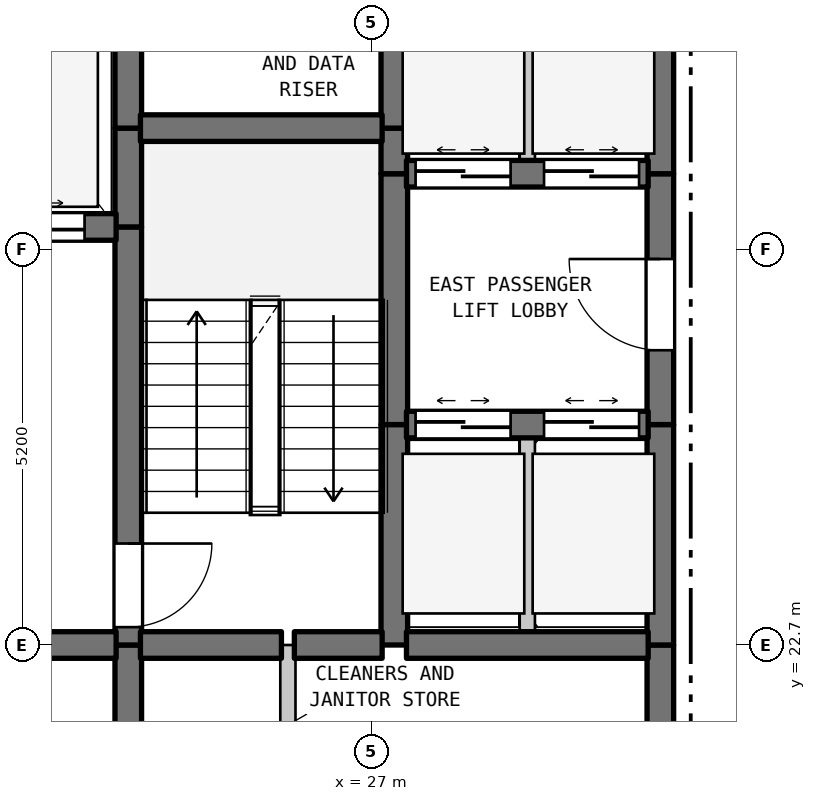
"""IFC4 building model, lengths in metres.
Left out: names, types, materials, properties, quantities, classifications, styles, units other than length and angle.
Written with IfcOpenShell. Run it as: python <this file> out.ifc"""

import sys

from ifc_helpers import new_model, si_unit, direction, frame, frame_2d, origin, place, context, subcontext, project, spatial, rectangle, extrude, element, fill, save


model = new_model("IFC4")
c1 = context("Model", 3, precision=1e-05, world=origin(), true_north=direction((0.0, 1.0)))
c2 = subcontext(c1, "Body", "Model", "MODEL_VIEW")
j1 = project(units=[si_unit("LENGTHUNIT", "METRE"), si_unit("PLANEANGLEUNIT", "RADIAN")], contexts=[c1])
p1 = place(None, origin())
s1 = spatial("IfcSite", under=j1, at=p1, CompositionType="ELEMENT")
p2 = place(p1, origin())
s2 = spatial("IfcBuilding", under=s1, at=p2, CompositionType="ELEMENT")
p3 = place(p2, frame((0.0, 0.0, 199.5)))
s3 = spatial("IfcBuildingStorey", under=s2, at=p3, CompositionType="ELEMENT", Elevation=199.5)
p4 = place(p3, frame((23.8, 19.5, 0.0), z_axis=(0.0, 0.0, 1.0), x_axis=(0.0, 1.0, 0.0)))
e1 = element("IfcWall", 1, at=p4, inside=s3, PredefinedType="SHEAR", context=c2, shape_type="SweptSolid", body=[
    extrude(rectangle(XDim=3.2, YDim=0.35, at=frame_2d((1.6, 0.0))), origin(), (0.0, 0.0, 1.0), 3.39),
])
p5 = place(p3, frame((23.8, 22.7, 0.0), z_axis=(0.0, 0.0, 1.0), x_axis=(0.0, 1.0, 0.0)))
e2 = element("IfcWall", 2, at=p5, inside=s3, PredefinedType="SHEAR", context=c2, shape_type="SweptSolid", body=[
    extrude(rectangle(XDim=5.5, YDim=0.35, at=frame_2d((2.75, 0.0))), origin(), (0.0, 0.0, 1.0), 3.39),
])
p6 = place(p5, frame((0.235, 0.0, 0.0)))
e3 = element("IfcOpeningElement", 3, at=p6, cuts=e2, PredefinedType="OPENING", context=c2, shape_type="SweptSolid", body=[
    extrude(rectangle(XDim=1.1, YDim=2.15, at=frame_2d((0.55, 1.075))), frame((0.0, 0.185, 0.0), z_axis=(0.0, -1.0, 0.0), x_axis=(1.0, 0.0, 0.0)), (0.0, 0.0, 1.0), 0.37),
])
for number, where, z_axis, x_axis in (
    (4, (23.8, 28.2, 0.0), (0.0, 0.0, 1.0), (0.0, 1.0, 0.0)),
    (5, (23.8, 29.5, 0.0), (0.0, 0.0, 1.0), (0.0, 1.0, 0.0)),
):
    element("IfcWall", number, at=place(p3, frame(where, z_axis=z_axis, x_axis=x_axis)), inside=s3, PredefinedType="SHEAR", context=c2, shape_type="SweptSolid", body=[
        extrude(rectangle(XDim=1.3, YDim=0.35, at=frame_2d((0.65, 0.0))), origin(), (0.0, 0.0, 1.0), 3.39),
    ])
p7 = place(p3, frame((25.9, 19.5, 0.0), z_axis=(0.0, 0.0, 1.0), x_axis=(0.0, 1.0, 0.0)))
e6 = element("IfcWall", 6, at=p7, inside=s3, PredefinedType="STANDARD", context=c2, shape_type="SweptSolid", body=[
    extrude(rectangle(XDim=3.2, YDim=0.2, at=frame_2d((1.6, 0.0))), origin(), (0.0, 0.0, 1.0), 3.39),
])
p8 = place(p3, frame((27.3, 22.7, 0.0), z_axis=(0.0, 0.0, 1.0), x_axis=(0.0, 1.0, 0.0)))
e7 = element("IfcWall", 7, at=p8, inside=s3, PredefinedType="SHEAR", context=c2, shape_type="SweptSolid", body=[
    extrude(rectangle(XDim=2.9, YDim=0.35, at=frame_2d((1.45, 0.0))), origin(), (0.0, 0.0, 1.0), 3.39),
])
p9 = place(p3, frame((27.3, 25.6, 0.0), z_axis=(0.0, 0.0, 1.0), x_axis=(0.0, 1.0, 0.0)))
e8 = element("IfcWall", 8, at=p9, inside=s3, PredefinedType="SHEAR", context=c2, shape_type="SweptSolid", body=[
    extrude(rectangle(XDim=3.3, YDim=0.35, at=frame_2d((1.65, 0.0))), origin(), (0.0, 0.0, 1.0), 3.39),
])
p10 = place(p3, frame((27.3, 28.9, 0.0), z_axis=(0.0, 0.0, 1.0), x_axis=(0.0, 1.0, 0.0)))
e9 = element("IfcWall", 9, at=p10, inside=s3, PredefinedType="SHEAR", context=c2, shape_type="SweptSolid", body=[
    extrude(rectangle(XDim=0.6, YDim=0.35, at=frame_2d((0.3, 0.0))), origin(), (0.0, 0.0, 1.0), 3.39),
])
p11 = place(p3, frame((27.3, 29.5, 0.0), z_axis=(0.0, 0.0, 1.0), x_axis=(0.0, 1.0, 0.0)))
e10 = element("IfcWall", 10, at=p11, inside=s3, PredefinedType="SHEAR", context=c2, shape_type="SweptSolid", body=[
    extrude(rectangle(XDim=2.0, YDim=0.35, at=frame_2d((1.0, 0.0))), origin(), (0.0, 0.0, 1.0), 3.39),
])
p12 = place(p3, frame((29.05, 22.7, 0.0), z_axis=(0.0, 0.0, 1.0), x_axis=(0.0, 1.0, 0.0)))
e11 = element("IfcWall", 11, at=p12, inside=s3, PredefinedType="STANDARD", context=c2, shape_type="SweptSolid", body=[
    extrude(rectangle(XDim=2.9, YDim=0.2, at=frame_2d((1.45, 0.0))), origin(), (0.0, 0.0, 1.0), 3.39),
])
p13 = place(p3, frame((29.05, 28.9, 0.0), z_axis=(0.0, 0.0, 1.0), x_axis=(0.0, 1.0, 0.0)))
e12 = element("IfcWall", 12, at=p13, inside=s3, PredefinedType="STANDARD", context=c2, shape_type="SweptSolid", body=[
    extrude(rectangle(XDim=2.6, YDim=0.2, at=frame_2d((1.3, 0.0))), origin(), (0.0, 0.0, 1.0), 3.39),
])
p14 = place(p3, frame((30.8, 19.5, 0.0), z_axis=(0.0, 0.0, 1.0), x_axis=(0.0, 1.0, 0.0)))
e13 = element("IfcWall", 13, at=p14, inside=s3, PredefinedType="SHEAR", context=c2, shape_type="SweptSolid", body=[
    extrude(rectangle(XDim=3.2, YDim=0.35, at=frame_2d((1.6, 0.0))), origin(), (0.0, 0.0, 1.0), 3.39),
])
p15 = place(p3, frame((30.8, 22.7, 0.0), z_axis=(0.0, 0.0, 1.0), x_axis=(0.0, 1.0, 0.0)))
e14 = element("IfcWall", 14, at=p15, inside=s3, PredefinedType="SHEAR", context=c2, shape_type="SweptSolid", body=[
    extrude(rectangle(XDim=2.9, YDim=0.35, at=frame_2d((1.45, 0.0))), origin(), (0.0, 0.0, 1.0), 3.39),
])
p16 = place(p3, frame((30.8, 25.6, 0.0), z_axis=(0.0, 0.0, 1.0), x_axis=(0.0, 1.0, 0.0)))
e15 = element("IfcWall", 15, at=p16, inside=s3, PredefinedType="SHEAR", context=c2, shape_type="SweptSolid", body=[
    extrude(rectangle(XDim=3.3, YDim=0.35, at=frame_2d((1.65, 0.0))), origin(), (0.0, 0.0, 1.0), 3.39),
])
p17 = place(p16, frame((0.978, 0.0, 0.0)))
e16 = element("IfcOpeningElement", 16, at=p17, cuts=e15, PredefinedType="OPENING", context=c2, shape_type="SweptSolid", body=[
    extrude(rectangle(XDim=1.2, YDim=2.2, at=frame_2d((0.6, 1.1))), frame((0.0, 0.185, 0.0), z_axis=(0.0, -1.0, 0.0), x_axis=(1.0, 0.0, 0.0)), (0.0, 0.0, 1.0), 0.37),
])
p18 = place(p3, frame((30.8, 28.9, 0.0), z_axis=(0.0, 0.0, 1.0), x_axis=(0.0, 1.0, 0.0)))
e17 = element("IfcWall", 17, at=p18, inside=s3, PredefinedType="SHEAR", context=c2, shape_type="SweptSolid", body=[
    extrude(rectangle(XDim=2.6, YDim=0.35, at=frame_2d((1.3, 0.0))), origin(), (0.0, 0.0, 1.0), 3.39),
])
p19 = place(p3, frame((19.16, 22.7, 0.0), z_axis=(0.0, 0.0, 1.0), x_axis=(1.0, 0.0, 0.0)))
e18 = element("IfcWall", 18, at=p19, inside=s3, PredefinedType="SHEAR", context=c2, shape_type="SweptSolid", body=[
    extrude(rectangle(XDim=4.48, YDim=0.35, at=frame_2d((2.24, 0.0))), origin(), (0.0, 0.0, 1.0), 3.39),
])
p20 = place(p19, frame((1.64, 0.0, 0.0)))
e19 = element("IfcOpeningElement", 19, at=p20, cuts=e18, PredefinedType="OPENING", context=c2, shape_type="SweptSolid", body=[
    extrude(rectangle(XDim=1.2, YDim=2.2, at=frame_2d((0.6, 1.1))), frame((0.0, 0.185, 0.0), z_axis=(0.0, -1.0, 0.0), x_axis=(1.0, 0.0, 0.0)), (0.0, 0.0, 1.0), 0.37),
])
p21 = place(p3, frame((23.96, 22.7, 0.0), z_axis=(0.0, 0.0, 1.0), x_axis=(1.0, 0.0, 0.0)))
e20 = element("IfcWall", 20, at=p21, inside=s3, PredefinedType="SHEAR", context=c2, shape_type="SweptSolid", body=[
    extrude(rectangle(XDim=1.855, YDim=0.35, at=frame_2d((0.927, 0.0))), origin(), (0.0, 0.0, 1.0), 3.39),
])
p22 = place(p3, frame((25.985, 22.7, 0.0), z_axis=(0.0, 0.0, 1.0), x_axis=(1.0, 0.0, 0.0)))
e21 = element("IfcWall", 21, at=p22, inside=s3, PredefinedType="SHEAR", context=c2, shape_type="SweptSolid", body=[
    extrude(rectangle(XDim=1.155, YDim=0.35, at=frame_2d((0.577, 0.0))), origin(), (0.0, 0.0, 1.0), 3.39),
])
p23 = place(p3, frame((27.46, 22.7, 0.0), z_axis=(0.0, 0.0, 1.0), x_axis=(1.0, 0.0, 0.0)))
e22 = element("IfcWall", 22, at=p23, inside=s3, PredefinedType="SHEAR", context=c2, shape_type="SweptSolid", body=[
    extrude(rectangle(XDim=3.18, YDim=0.35, at=frame_2d((1.59, 0.0))), origin(), (0.0, 0.0, 1.0), 3.39),
])
p24 = place(p3, frame((27.46, 25.6, 0.0), z_axis=(0.0, 0.0, 1.0), x_axis=(1.0, 0.0, 0.0)))
e23 = element("IfcWall", 23, at=p24, inside=s3, PredefinedType="SHEAR", context=c2, shape_type="SweptSolid", body=[
    extrude(rectangle(XDim=3.18, YDim=0.35, at=frame_2d((1.59, 0.0))), origin(), (0.0, 0.0, 1.0), 3.39),
])
p25 = place(p24, frame((0.12, 0.0, 0.0)))
e24 = element("IfcOpeningElement", 24, at=p25, cuts=e23, PredefinedType="OPENING", context=c2, shape_type="SweptSolid", body=[
    extrude(rectangle(XDim=1.25, YDim=2.2, at=frame_2d((0.625, 1.1))), frame((0.0, 0.185, 0.0), z_axis=(0.0, -1.0, 0.0), x_axis=(1.0, 0.0, 0.0)), (0.0, 0.0, 1.0), 0.37),
])
p26 = place(p24, frame((1.81, 0.0, 0.0)))
e25 = element("IfcOpeningElement", 25, at=p26, cuts=e23, PredefinedType="OPENING", context=c2, shape_type="SweptSolid", body=[
    extrude(rectangle(XDim=1.25, YDim=2.2, at=frame_2d((0.625, 1.1))), frame((0.0, 0.185, 0.0), z_axis=(0.0, -1.0, 0.0), x_axis=(1.0, 0.0, 0.0)), (0.0, 0.0, 1.0), 0.37),
])
p27 = place(p3, frame((19.16, 28.2, 0.0), z_axis=(0.0, 0.0, 1.0), x_axis=(1.0, 0.0, 0.0)))
e26 = element("IfcWall", 26, at=p27, inside=s3, PredefinedType="SHEAR", context=c2, shape_type="SweptSolid", body=[
    extrude(rectangle(XDim=4.48, YDim=0.35, at=frame_2d((2.24, 0.0))), origin(), (0.0, 0.0, 1.0), 3.39),
])
p28 = place(p27, frame((0.415, 0.0, 0.0)))
e27 = element("IfcOpeningElement", 27, at=p28, cuts=e26, PredefinedType="OPENING", context=c2, shape_type="SweptSolid", body=[
    extrude(rectangle(XDim=1.25, YDim=2.2, at=frame_2d((0.625, 1.1))), frame((0.0, 0.185, 0.0), z_axis=(0.0, -1.0, 0.0), x_axis=(1.0, 0.0, 0.0)), (0.0, 0.0, 1.0), 0.37),
])
p29 = place(p27, frame((2.815, 0.0, 0.0)))
e28 = element("IfcOpeningElement", 28, at=p29, cuts=e26, PredefinedType="OPENING", context=c2, shape_type="SweptSolid", body=[
    extrude(rectangle(XDim=1.25, YDim=2.2, at=frame_2d((0.625, 1.1))), frame((0.0, 0.185, 0.0), z_axis=(0.0, -1.0, 0.0), x_axis=(1.0, 0.0, 0.0)), (0.0, 0.0, 1.0), 0.37),
])
p30 = place(p3, frame((27.46, 28.9, 0.0), z_axis=(0.0, 0.0, 1.0), x_axis=(1.0, 0.0, 0.0)))
e29 = element("IfcWall", 29, at=p30, inside=s3, PredefinedType="SHEAR", context=c2, shape_type="SweptSolid", body=[
    extrude(rectangle(XDim=3.18, YDim=0.35, at=frame_2d((1.59, 0.0))), origin(), (0.0, 0.0, 1.0), 3.39),
])
p31 = place(p30, frame((0.12, 0.0, 0.0)))
e30 = element("IfcOpeningElement", 30, at=p31, cuts=e29, PredefinedType="OPENING", context=c2, shape_type="SweptSolid", body=[
    extrude(rectangle(XDim=1.25, YDim=2.2, at=frame_2d((0.625, 1.1))), frame((0.0, 0.185, 0.0), z_axis=(0.0, -1.0, 0.0), x_axis=(1.0, 0.0, 0.0)), (0.0, 0.0, 1.0), 0.37),
])
p32 = place(p30, frame((1.81, 0.0, 0.0)))
e31 = element("IfcOpeningElement", 31, at=p32, cuts=e29, PredefinedType="OPENING", context=c2, shape_type="SweptSolid", body=[
    extrude(rectangle(XDim=1.25, YDim=2.2, at=frame_2d((0.625, 1.1))), frame((0.0, 0.185, 0.0), z_axis=(0.0, -1.0, 0.0), x_axis=(1.0, 0.0, 0.0)), (0.0, 0.0, 1.0), 0.37),
])
p33 = place(p3, frame((23.96, 29.5, 0.0), z_axis=(0.0, 0.0, 1.0), x_axis=(1.0, 0.0, 0.0)))
e32 = element("IfcWall", 32, at=p33, inside=s3, PredefinedType="SHEAR", context=c2, shape_type="SweptSolid", body=[
    extrude(rectangle(XDim=3.18, YDim=0.35, at=frame_2d((1.59, 0.0))), origin(), (0.0, 0.0, 1.0), 3.39),
])
p34 = place(p6, frame((1.1, 0.0, 0.0), z_axis=(0.0, 0.0, 1.0), x_axis=(-1.0, 0.0, 0.0)))
e33 = element("IfcDoor", 33, at=p34, inside=s3, OperationType="SINGLE_SWING_RIGHT", PredefinedType="DOOR", context=c2, shape_type="SweptSolid", body=[
    extrude(rectangle(XDim=1.1, YDim=2.15, at=frame_2d((0.55, 1.075))), frame((0.0, 0.025, 0.0), z_axis=(0.0, -1.0, 0.0), x_axis=(1.0, 0.0, 0.0)), (0.0, 0.0, 1.0), 0.05),
])
fill(e3, e33)
p35 = place(p17, origin())
e34 = element("IfcDoor", 34, at=p35, inside=s3, OperationType="SINGLE_SWING_RIGHT", PredefinedType="DOOR", context=c2, shape_type="SweptSolid", body=[
    extrude(rectangle(XDim=1.2, YDim=2.2, at=frame_2d((0.6, 1.1))), frame((0.0, 0.025, 0.0), z_axis=(0.0, -1.0, 0.0), x_axis=(1.0, 0.0, 0.0)), (0.0, 0.0, 1.0), 0.05),
])
fill(e16, e34)
p36 = place(p25, origin())
e35 = element("IfcDoor", 35, at=p36, inside=s3, OperationType="DOUBLE_DOOR_SLIDING", PredefinedType="DOOR", context=c2, shape_type="SweptSolid", body=[
    extrude(rectangle(XDim=1.25, YDim=2.2, at=frame_2d((0.625, 1.1))), frame((0.0, 0.025, 0.0), z_axis=(0.0, -1.0, 0.0), x_axis=(1.0, 0.0, 0.0)), (0.0, 0.0, 1.0), 0.05),
])
fill(e24, e35)
p37 = place(p26, origin())
e36 = element("IfcDoor", 36, at=p37, inside=s3, OperationType="DOUBLE_DOOR_SLIDING", PredefinedType="DOOR", context=c2, shape_type="SweptSolid", body=[
    extrude(rectangle(XDim=1.25, YDim=2.2, at=frame_2d((0.625, 1.1))), frame((0.0, 0.025, 0.0), z_axis=(0.0, -1.0, 0.0), x_axis=(1.0, 0.0, 0.0)), (0.0, 0.0, 1.0), 0.05),
])
fill(e25, e36)
p38 = place(p29, origin())
e37 = element("IfcDoor", 37, at=p38, inside=s3, OperationType="DOUBLE_DOOR_SLIDING", PredefinedType="DOOR", context=c2, shape_type="SweptSolid", body=[
    extrude(rectangle(XDim=1.25, YDim=2.2, at=frame_2d((0.625, 1.1))), frame((0.0, 0.025, 0.0), z_axis=(0.0, -1.0, 0.0), x_axis=(1.0, 0.0, 0.0)), (0.0, 0.0, 1.0), 0.05),
])
fill(e28, e37)
p39 = place(p31, origin())
e38 = element("IfcDoor", 38, at=p39, inside=s3, OperationType="DOUBLE_DOOR_SLIDING", PredefinedType="DOOR", context=c2, shape_type="SweptSolid", body=[
    extrude(rectangle(XDim=1.25, YDim=2.2, at=frame_2d((0.625, 1.1))), frame((0.0, 0.025, 0.0), z_axis=(0.0, -1.0, 0.0), x_axis=(1.0, 0.0, 0.0)), (0.0, 0.0, 1.0), 0.05),
])
fill(e30, e38)
p40 = place(p32, origin())
e39 = element("IfcDoor", 39, at=p40, inside=s3, OperationType="DOUBLE_DOOR_SLIDING", PredefinedType="DOOR", context=c2, shape_type="SweptSolid", body=[
    extrude(rectangle(XDim=1.25, YDim=2.2, at=frame_2d((0.625, 1.1))), frame((0.0, 0.025, 0.0), z_axis=(0.0, -1.0, 0.0), x_axis=(1.0, 0.0, 0.0)), (0.0, 0.0, 1.0), 0.05),
])
fill(e31, e39)
save(model, sys.argv[1])
